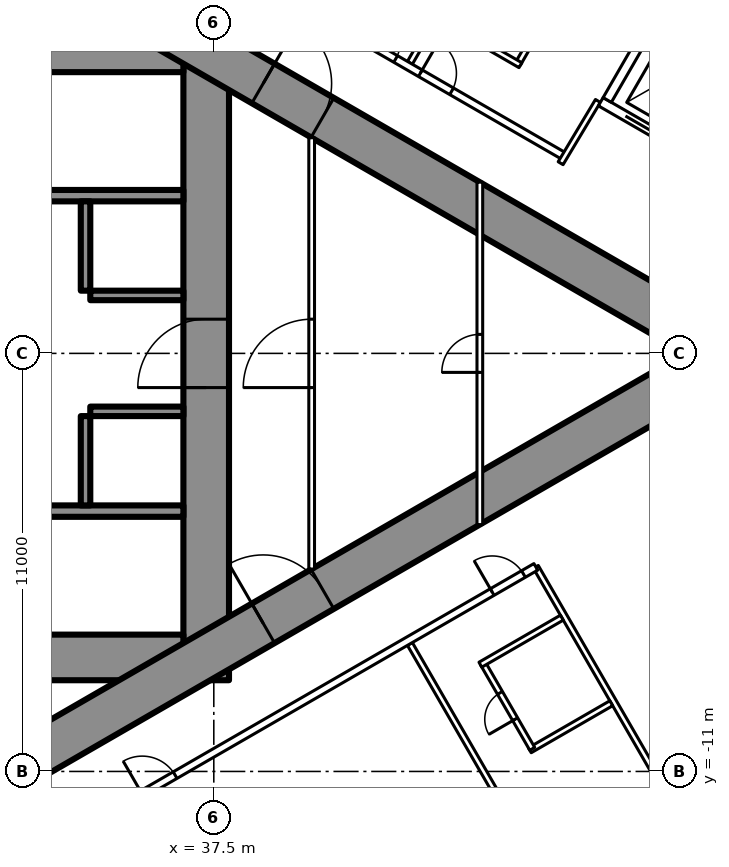
"""IFC4 building model, lengths in metres.
Left out: names, types, materials, properties, quantities, classifications, styles, units other than length and angle.
Written with IfcOpenShell. Run it as: python <this file> out.ifc"""

import sys

from ifc_helpers import new_model, si_unit, direction, frame, frame_2d, origin, origin_2d, place, context, subcontext, project, spatial, rectangle, circle, extrude, element, fill, save


model = new_model("IFC4")
c1 = context("Model", 3, precision=1e-05, world=origin(), true_north=direction((0.0, 1.0)))
c2 = subcontext(c1, "Body", "Model", "MODEL_VIEW")
j1 = project(units=[si_unit("LENGTHUNIT", "METRE"), si_unit("PLANEANGLEUNIT", "RADIAN")], contexts=[c1])
p1 = place(None, origin())
s1 = spatial("IfcSite", under=j1, at=p1, CompositionType="ELEMENT")
p2 = place(p1, origin())
s2 = spatial("IfcBuilding", under=s1, at=p2, CompositionType="ELEMENT")
p3 = place(p2, frame((0.0, 0.0, 229.7)))
s3 = spatial("IfcBuildingStorey", under=s2, at=p3, CompositionType="ELEMENT", Elevation=229.7)
p4 = place(p3, frame((49.834, -12.332, 0.0), z_axis=(0.0, 0.0, 1.0), x_axis=(1.0, 0.0, 0.0)))
e1 = element("IfcColumn", 1, at=p4, inside=s3, PredefinedType="COLUMN", context=c2, shape_type="SweptSolid", body=[
    extrude(circle(Radius=1.2, at=origin_2d()), origin(), (0.0, 0.0, 1.0), 3.6),
])
p5 = place(p3, frame((37.3, -8.6, 0.0), z_axis=(0.0, 0.0, 1.0), x_axis=(0.0, 1.0, 0.0)))
e2 = element("IfcWall", 2, at=p5, inside=s3, PredefinedType="SHEAR", context=c2, shape_type="SweptSolid", body=[
    extrude(rectangle(XDim=17.2, YDim=1.2, at=frame_2d((8.6, 0.0))), origin(), (0.0, 0.0, 1.0), 3.6),
])
p6 = place(p5, frame((7.7, 0.0, 0.0)))
e3 = element("IfcOpeningElement", 3, at=p6, cuts=e2, PredefinedType="OPENING", context=c2, shape_type="SweptSolid", body=[
    extrude(rectangle(XDim=1.8, YDim=2.2, at=frame_2d((0.9, 1.1))), frame((0.0, 0.61, 0.0), z_axis=(0.0, -1.0, 0.0), x_axis=(1.0, 0.0, 0.0)), (0.0, 0.0, 1.0), 1.22),
])
p7 = place(p3, frame((28.3, -8.0, 0.0), z_axis=(0.0, 0.0, 1.0), x_axis=(1.0, 0.0, 0.0)))
e4 = element("IfcWall", 4, at=p7, inside=s3, PredefinedType="SHEAR", context=c2, shape_type="SweptSolid", body=[
    extrude(rectangle(XDim=8.4, YDim=1.2, at=frame_2d((4.2, 0.0))), origin(), (0.0, 0.0, 1.0), 3.6),
])
p8 = place(p7, frame((0.25, 0.0, 0.0)))
e5 = element("IfcOpeningElement", 5, at=p8, cuts=e4, PredefinedType="OPENING", context=c2, shape_type="SweptSolid", body=[
    extrude(rectangle(XDim=1.0, YDim=2.2, at=frame_2d((0.5, 1.1))), frame((0.0, 0.61, 0.0), z_axis=(0.0, -1.0, 0.0), x_axis=(1.0, 0.0, 0.0)), (0.0, 0.0, 1.0), 1.22),
])
p9 = place(p3, frame((28.3, 8.0, 0.0), z_axis=(0.0, 0.0, 1.0), x_axis=(1.0, 0.0, 0.0)))
e6 = element("IfcWall", 6, at=p9, inside=s3, PredefinedType="SHEAR", context=c2, shape_type="SweptSolid", body=[
    extrude(rectangle(XDim=8.4, YDim=1.2, at=frame_2d((4.2, 0.0))), origin(), (0.0, 0.0, 1.0), 3.6),
])
p10 = place(p9, frame((0.25, 0.0, 0.0)))
e7 = element("IfcOpeningElement", 7, at=p10, cuts=e6, PredefinedType="OPENING", context=c2, shape_type="SweptSolid", body=[
    extrude(rectangle(XDim=1.0, YDim=2.2, at=frame_2d((0.5, 1.1))), frame((0.0, 0.61, 0.0), z_axis=(0.0, -1.0, 0.0), x_axis=(1.0, 0.0, 0.0)), (0.0, 0.0, 1.0), 1.22),
])
for number, where, z_axis, x_axis in (
    (8, (28.3, -4.15, 0.0), (0.0, 0.0, 1.0), (1.0, 0.0, 0.0)),
    (9, (28.3, 4.15, 0.0), (0.0, 0.0, 1.0), (1.0, 0.0, 0.0)),
):
    element("IfcWall", number, at=place(p3, frame(where, z_axis=z_axis, x_axis=x_axis)), inside=s3, PredefinedType="SHEAR", context=c2, shape_type="SweptSolid", body=[
        extrude(rectangle(XDim=8.4, YDim=0.3, at=frame_2d((4.2, 0.0))), origin(), (0.0, 0.0, 1.0), 3.6),
    ])
p11 = place(p3, frame((34.125, -4.0, 0.0), z_axis=(0.0, 0.0, 1.0), x_axis=(0.0, 1.0, 0.0)))
e10 = element("IfcWall", 10, at=p11, inside=s3, PredefinedType="SHEAR", context=c2, shape_type="SweptSolid", body=[
    extrude(rectangle(XDim=2.35, YDim=0.25, at=frame_2d((1.175, 0.0))), origin(), (0.0, 0.0, 1.0), 3.6),
])
p12 = place(p3, frame((34.25, -1.525, 0.0), z_axis=(0.0, 0.0, 1.0), x_axis=(1.0, 0.0, 0.0)))
e11 = element("IfcWall", 11, at=p12, inside=s3, PredefinedType="SHEAR", context=c2, shape_type="SweptSolid", body=[
    extrude(rectangle(XDim=2.45, YDim=0.25, at=frame_2d((1.225, 0.0))), origin(), (0.0, 0.0, 1.0), 3.6),
])
p13 = place(p3, frame((34.125, 1.65, 0.0), z_axis=(0.0, 0.0, 1.0), x_axis=(0.0, 1.0, 0.0)))
e12 = element("IfcWall", 12, at=p13, inside=s3, PredefinedType="SHEAR", context=c2, shape_type="SweptSolid", body=[
    extrude(rectangle(XDim=2.35, YDim=0.25, at=frame_2d((1.175, 0.0))), origin(), (0.0, 0.0, 1.0), 3.6),
])
p14 = place(p3, frame((34.25, 1.525, 0.0), z_axis=(0.0, 0.0, 1.0), x_axis=(1.0, 0.0, 0.0)))
e13 = element("IfcWall", 13, at=p14, inside=s3, PredefinedType="SHEAR", context=c2, shape_type="SweptSolid", body=[
    extrude(rectangle(XDim=2.45, YDim=0.25, at=frame_2d((1.225, 0.0))), origin(), (0.0, 0.0, 1.0), 3.6),
])
p15 = place(p3, frame((27.2, -13.8, 0.0), z_axis=(0.0, 0.0, 1.0), x_axis=(0.866027159892, 0.499996958321, 0.0)))
e14 = element("IfcWall", 14, at=p15, inside=s3, PredefinedType="SHEAR", context=c2, shape_type="SweptSolid", body=[
    extrude(rectangle(XDim=27.947, YDim=1.2, at=frame_2d((13.973, 0.0))), origin(), (0.0, 0.0, 1.0), 3.6),
])
p16 = place(p15, frame((4.6, 0.0, 0.0)))
e15 = element("IfcOpeningElement", 15, at=p16, cuts=e14, PredefinedType="OPENING", context=c2, shape_type="SweptSolid", body=[
    extrude(rectangle(XDim=1.0, YDim=2.2, at=frame_2d((0.5, 1.1))), frame((0.0, 0.61, 0.0), z_axis=(0.0, -1.0, 0.0), x_axis=(1.0, 0.0, 0.0)), (0.0, 0.0, 1.0), 1.22),
])
p17 = place(p15, frame((13.395, 0.0, 0.0)))
e16 = element("IfcOpeningElement", 16, at=p17, cuts=e14, PredefinedType="OPENING", context=c2, shape_type="SweptSolid", body=[
    extrude(rectangle(XDim=1.8, YDim=2.2, at=frame_2d((0.9, 1.1))), frame((0.0, 0.61, 0.0), z_axis=(0.0, -1.0, 0.0), x_axis=(1.0, 0.0, 0.0)), (0.0, 0.0, 1.0), 1.22),
])
p18 = place(p3, frame((27.2, 13.8, 0.0), z_axis=(0.0, 0.0, 1.0), x_axis=(0.866024515034, -0.500001539357, 0.0)))
e17 = element("IfcWall", 17, at=p18, inside=s3, PredefinedType="SHEAR", context=c2, shape_type="SweptSolid", body=[
    extrude(rectangle(XDim=26.907, YDim=1.2, at=frame_2d((13.454, 0.0))), origin(), (0.0, 0.0, 1.0), 3.6),
])
p19 = place(p18, frame((4.6, 0.0, 0.0)))
e18 = element("IfcOpeningElement", 18, at=p19, cuts=e17, PredefinedType="OPENING", context=c2, shape_type="SweptSolid", body=[
    extrude(rectangle(XDim=1.0, YDim=2.2, at=frame_2d((0.5, 1.1))), frame((0.0, 0.61, 0.0), z_axis=(0.0, -1.0, 0.0), x_axis=(1.0, 0.0, 0.0)), (0.0, 0.0, 1.0), 1.22),
])
p20 = place(p18, frame((13.395, 0.0, 0.0)))
e19 = element("IfcOpeningElement", 19, at=p20, cuts=e17, PredefinedType="OPENING", context=c2, shape_type="SweptSolid", body=[
    extrude(rectangle(XDim=1.8, YDim=2.2, at=frame_2d((0.9, 1.1))), frame((0.0, 0.61, 0.0), z_axis=(0.0, -1.0, 0.0), x_axis=(1.0, 0.0, 0.0)), (0.0, 0.0, 1.0), 1.22),
])
p21 = place(p3, frame((42.66, -7.646, 0.0), z_axis=(0.0, 0.0, 1.0), x_axis=(0.499996592859, -0.866027370889, 0.0)))
e20 = element("IfcWall", 20, at=p21, inside=s3, PredefinedType="PARTITIONING", context=c2, shape_type="SweptSolid", body=[
    extrude(rectangle(XDim=6.398, YDim=0.15, at=frame_2d((3.199, 0.0))), origin(), (0.0, 0.0, 1.0), 2.45),
])
p22 = place(p3, frame((45.973, -5.617, 0.0), z_axis=(0.0, 0.0, 1.0), x_axis=(0.499985856986, -0.866033569104, 0.0)))
e21 = element("IfcWall", 21, at=p22, inside=s3, PredefinedType="PARTITIONING", context=c2, shape_type="SweptSolid", body=[
    extrude(rectangle(XDim=6.526, YDim=0.15, at=frame_2d((3.263, 0.0))), origin(), (0.0, 0.0, 1.0), 2.45),
])
p23 = place(p3, frame((42.66, 7.646, 0.0), z_axis=(0.0, 0.0, 1.0), x_axis=(0.499996592859, 0.866027370889, 0.0)))
e22 = element("IfcWall", 22, at=p23, inside=s3, PredefinedType="PARTITIONING", context=c2, shape_type="SweptSolid", body=[
    extrude(rectangle(XDim=6.398, YDim=0.15, at=frame_2d((3.199, 0.0))), origin(), (0.0, 0.0, 1.0), 2.45),
])
p24 = place(p3, frame((28.959, 15.44, 0.0), z_axis=(0.0, 0.0, 1.0), x_axis=(0.866028936079, -0.499993881836, 0.0)))
e23 = element("IfcWall", 23, at=p24, inside=s3, PredefinedType="PARTITIONING", context=c2, shape_type="SweptSolid", body=[
    extrude(rectangle(XDim=20.503, YDim=0.2, at=frame_2d((10.251, 0.0))), origin(), (0.0, 0.0, 1.0), 3.35),
])
p25 = place(p24, frame((16.137, 0.0, 0.0)))
e24 = element("IfcOpeningElement", 24, at=p25, cuts=e23, PredefinedType="OPENING", context=c2, shape_type="SweptSolid", body=[
    extrude(rectangle(XDim=0.95, YDim=2.2, at=frame_2d((0.475, 1.1))), frame((0.0, 0.11, 0.0), z_axis=(0.0, -1.0, 0.0), x_axis=(1.0, 0.0, 0.0)), (0.0, 0.0, 1.0), 0.22),
])
p26 = place(p24, frame((14.437, 0.0, 0.0)))
e25 = element("IfcOpeningElement", 25, at=p26, cuts=e23, PredefinedType="OPENING", context=c2, shape_type="SweptSolid", body=[
    extrude(rectangle(XDim=0.95, YDim=2.2, at=frame_2d((0.475, 1.1))), frame((0.0, 0.11, 0.0), z_axis=(0.0, -1.0, 0.0), x_axis=(1.0, 0.0, 0.0)), (0.0, 0.0, 1.0), 0.22),
])
p27 = place(p24, frame((2.244, 0.0, 0.0)))
e26 = element("IfcOpeningElement", 26, at=p27, cuts=e23, PredefinedType="OPENING", context=c2, shape_type="SweptSolid", body=[
    extrude(rectangle(XDim=1.8, YDim=2.04, at=frame_2d((0.9, 1.02))), frame((0.0, 0.11, 0.0), z_axis=(0.0, -1.0, 0.0), x_axis=(1.0, 0.0, 0.0)), (0.0, 0.0, 1.0), 0.22),
])
p28 = place(p3, frame((47.606, 6.642, 0.0), z_axis=(0.0, 0.0, 1.0), x_axis=(-0.51353662755, -0.858067673418, 0.0)))
e27 = element("IfcWall", 27, at=p28, inside=s3, PredefinedType="PARTITIONING", context=c2, shape_type="SweptSolid", body=[
    extrude(rectangle(XDim=1.91, YDim=0.15, at=frame_2d((0.955, 0.0))), origin(), (0.0, 0.0, 1.0), 3.35),
])
p29 = place(p3, frame((45.814, -10.443, 0.0), z_axis=(0.0, 0.0, 1.0), x_axis=(0.866073894602, 0.499916002032, 0.0)))
e28 = element("IfcWall", 28, at=p29, inside=s3, PredefinedType="PARTITIONING", context=c2, shape_type="SweptSolid", body=[
    extrude(rectangle(XDim=2.475, YDim=0.15, at=frame_2d((1.238, 0.0))), origin(), (0.0, 0.0, 1.0), 3.35),
])
p30 = place(p3, frame((44.579, -8.154, 0.0), z_axis=(0.0, 0.0, 1.0), x_axis=(0.500006934395, -0.866021400173, 0.0)))
e29 = element("IfcWall", 29, at=p30, inside=s3, PredefinedType="PARTITIONING", context=c2, shape_type="SweptSolid", body=[
    extrude(rectangle(XDim=2.6, YDim=0.15, at=frame_2d((1.3, 0.0))), origin(), (0.0, 0.0, 1.0), 3.35),
])
p31 = place(p30, frame((0.9, 0.0, 0.0)))
e30 = element("IfcOpeningElement", 30, at=p31, cuts=e29, PredefinedType="OPENING", context=c2, shape_type="SweptSolid", body=[
    extrude(rectangle(XDim=0.8, YDim=2.2, at=frame_2d((0.4, 1.1))), frame((0.0, 0.085, 0.0), z_axis=(0.0, -1.0, 0.0), x_axis=(1.0, 0.0, 0.0)), (0.0, 0.0, 1.0), 0.17),
])
p32 = place(p3, frame((44.514, -8.191, 0.0), z_axis=(0.0, 0.0, 1.0), x_axis=(0.866031185235, 0.4999899861, 0.0)))
e31 = element("IfcWall", 31, at=p32, inside=s3, PredefinedType="PARTITIONING", context=c2, shape_type="SweptSolid", body=[
    extrude(rectangle(XDim=2.475, YDim=0.15, at=frame_2d((1.238, 0.0))), origin(), (0.0, 0.0, 1.0), 3.35),
])
p33 = place(p3, frame((45.503, 7.621, 0.0), z_axis=(0.0, 0.0, 1.0), x_axis=(0.500006934395, 0.866021400173, 0.0)))
e32 = element("IfcWall", 32, at=p33, inside=s3, PredefinedType="PARTITIONING", context=c2, shape_type="SweptSolid", body=[
    extrude(rectangle(XDim=2.6, YDim=0.15, at=frame_2d((1.3, 0.0))), origin(), (0.0, 0.0, 1.0), 3.35),
])
p34 = place(p33, frame((0.9, 0.0, 0.0)))
e33 = element("IfcOpeningElement", 33, at=p34, cuts=e32, PredefinedType="OPENING", context=c2, shape_type="SweptSolid", body=[
    extrude(rectangle(XDim=0.8, YDim=2.2, at=frame_2d((0.4, 1.1))), frame((0.0, 0.085, 0.0), z_axis=(0.0, -1.0, 0.0), x_axis=(1.0, 0.0, 0.0)), (0.0, 0.0, 1.0), 0.17),
])
p35 = place(p3, frame((43.425, 8.821, 0.0), z_axis=(0.0, 0.0, 1.0), x_axis=(0.866006523861, -0.500032699561, 0.0)))
e34 = element("IfcWall", 34, at=p35, inside=s3, PredefinedType="PARTITIONING", context=c2, shape_type="SweptSolid", body=[
    extrude(rectangle(XDim=2.475, YDim=0.15, at=frame_2d((1.237, 0.0))), origin(), (0.0, 0.0, 1.0), 2.5),
])
p36 = place(p3, frame((28.959, -15.44, 0.0), z_axis=(0.0, 0.0, 1.0), x_axis=(0.866025204199, 0.500000345692, 0.0)))
e35 = element("IfcWall", 35, at=p36, inside=s3, PredefinedType="PARTITIONING", context=c2, shape_type="SweptSolid", body=[
    extrude(rectangle(XDim=19.646, YDim=0.2, at=frame_2d((9.823, 0.0))), origin(), (0.0, 0.0, 1.0), 3.35),
])
p37 = place(p36, frame((1.494, 0.0, 0.0)))
e36 = element("IfcOpeningElement", 36, at=p37, cuts=e35, PredefinedType="OPENING", context=c2, shape_type="SweptSolid", body=[
    extrude(rectangle(XDim=1.8, YDim=2.04, at=frame_2d((0.9, 1.02))), frame((0.0, 0.11, 0.0), z_axis=(0.0, -1.0, 0.0), x_axis=(1.0, 0.0, 0.0)), (0.0, 0.0, 1.0), 0.22),
])
p38 = place(p36, frame((7.687, 0.0, 0.0)))
e37 = element("IfcOpeningElement", 37, at=p38, cuts=e35, PredefinedType="OPENING", context=c2, shape_type="SweptSolid", body=[
    extrude(rectangle(XDim=1.0, YDim=2.2, at=frame_2d((0.5, 1.1))), frame((0.0, 0.11, 0.0), z_axis=(0.0, -1.0, 0.0), x_axis=(1.0, 0.0, 0.0)), (0.0, 0.0, 1.0), 0.22),
])
p39 = place(p36, frame((18.321, 0.0, 0.0)))
e38 = element("IfcOpeningElement", 38, at=p39, cuts=e35, PredefinedType="OPENING", context=c2, shape_type="SweptSolid", body=[
    extrude(rectangle(XDim=0.95, YDim=2.2, at=frame_2d((0.475, 1.1))), frame((0.0, 0.11, 0.0), z_axis=(0.0, -1.0, 0.0), x_axis=(1.0, 0.0, 0.0)), (0.0, 0.0, 1.0), 0.22),
])
p40 = place(p3, frame((40.075, -5.674, 0.0), z_axis=(0.0, 0.0, 1.0), x_axis=(0.0, 1.0, 0.0)))
e39 = element("IfcWall", 39, at=p40, inside=s3, PredefinedType="PARTITIONING", context=c2, shape_type="SweptSolid", body=[
    extrude(rectangle(XDim=11.348, YDim=0.15, at=frame_2d((5.674, 0.0))), origin(), (0.0, 0.0, 1.0), 3.35),
])
p41 = place(p40, frame((4.774, 0.0, 0.0)))
e40 = element("IfcOpeningElement", 40, at=p41, cuts=e39, PredefinedType="OPENING", context=c2, shape_type="SweptSolid", body=[
    extrude(rectangle(XDim=1.8, YDim=2.2, at=frame_2d((0.9, 1.1))), frame((0.0, 0.085, 0.0), z_axis=(0.0, -1.0, 0.0), x_axis=(1.0, 0.0, 0.0)), (0.0, 0.0, 1.0), 0.17),
])
p42 = place(p3, frame((44.5, -4.505, 0.0), z_axis=(0.0, 0.0, 1.0), x_axis=(0.0, 1.0, 0.0)))
e41 = element("IfcWall", 41, at=p42, inside=s3, PredefinedType="PARTITIONING", context=c2, shape_type="SweptSolid", body=[
    extrude(rectangle(XDim=9.009, YDim=0.15, at=frame_2d((4.505, 0.0))), origin(), (0.0, 0.0, 1.0), 3.35),
])
p43 = place(p42, frame((4.005, 0.0, 0.0)))
e42 = element("IfcOpeningElement", 42, at=p43, cuts=e41, PredefinedType="OPENING", context=c2, shape_type="SweptSolid", body=[
    extrude(rectangle(XDim=1.0, YDim=2.2, at=frame_2d((0.5, 1.1))), frame((0.0, 0.085, 0.0), z_axis=(0.0, -1.0, 0.0), x_axis=(1.0, 0.0, 0.0)), (0.0, 0.0, 1.0), 0.17),
])
p44 = place(p3, frame((47.681, 6.622, 0.0), z_axis=(0.0, 0.0, 1.0), x_axis=(0.86603344179, -0.499986077507, 0.0)))
e43 = element("IfcWall", 43, at=p44, inside=s3, PredefinedType="PARTITIONING", context=c2, shape_type="SweptSolid", body=[
    extrude(rectangle(XDim=6.6, YDim=0.25, at=frame_2d((3.3, 0.0))), origin(), (0.0, 0.0, 1.0), 3.35),
])
p45 = place(p44, frame((0.75, 0.0, 0.0)))
e44 = element("IfcOpeningElement", 44, at=p45, cuts=e43, PredefinedType="OPENING", context=c2, shape_type="SweptSolid", body=[
    extrude(rectangle(XDim=1.1, YDim=2.2, at=frame_2d((0.55, 1.1))), frame((0.0, 0.135, 0.0), z_axis=(0.0, -1.0, 0.0), x_axis=(1.0, 0.0, 0.0)), (0.0, 0.0, 1.0), 0.27),
])
p46 = place(p44, frame((2.75, 0.0, 0.0)))
e45 = element("IfcOpeningElement", 45, at=p46, cuts=e43, PredefinedType="OPENING", context=c2, shape_type="SweptSolid", body=[
    extrude(rectangle(XDim=1.1, YDim=2.2, at=frame_2d((0.55, 1.1))), frame((0.0, 0.135, 0.0), z_axis=(0.0, -1.0, 0.0), x_axis=(1.0, 0.0, 0.0)), (0.0, 0.0, 1.0), 0.27),
])
p47 = place(p44, frame((4.75, 0.0, 0.0)))
e46 = element("IfcOpeningElement", 46, at=p47, cuts=e43, PredefinedType="OPENING", context=c2, shape_type="SweptSolid", body=[
    extrude(rectangle(XDim=1.1, YDim=2.2, at=frame_2d((0.55, 1.1))), frame((0.0, 0.135, 0.0), z_axis=(0.0, -1.0, 0.0), x_axis=(1.0, 0.0, 0.0)), (0.0, 0.0, 1.0), 0.27),
])
p48 = place(p3, frame((47.852, 6.668, 0.0), z_axis=(0.0, 0.0, 1.0), x_axis=(0.499929347863, 0.866066190972, 0.0)))
e47 = element("IfcWall", 47, at=p48, inside=s3, PredefinedType="PARTITIONING", context=c2, shape_type="SweptSolid", body=[
    extrude(rectangle(XDim=3.201, YDim=0.25, at=frame_2d((1.6, 0.0))), origin(), (0.0, 0.0, 1.0), 3.35),
])
p49 = place(p38, origin())
e48 = element("IfcDoor", 48, at=p49, inside=s3, OperationType="SINGLE_SWING_LEFT", PredefinedType="DOOR", context=c2, shape_type="SweptSolid", body=[
    extrude(rectangle(XDim=1.0, YDim=2.2, at=frame_2d((0.5, 1.1))), frame((0.0, 0.025, 0.0), z_axis=(0.0, -1.0, 0.0), x_axis=(1.0, 0.0, 0.0)), (0.0, 0.0, 1.0), 0.05),
])
fill(e37, e48)
p50 = place(p31, origin())
e49 = element("IfcDoor", 49, at=p50, inside=s3, OperationType="SINGLE_SWING_RIGHT", PredefinedType="DOOR", context=c2, shape_type="SweptSolid", body=[
    extrude(rectangle(XDim=0.8, YDim=2.2, at=frame_2d((0.4, 1.1))), frame((0.0, 0.025, 0.0), z_axis=(0.0, -1.0, 0.0), x_axis=(1.0, 0.0, 0.0)), (0.0, 0.0, 1.0), 0.05),
])
fill(e30, e49)
p51 = place(p39, origin())
e50 = element("IfcDoor", 50, at=p51, inside=s3, OperationType="SINGLE_SWING_LEFT", PredefinedType="DOOR", context=c2, shape_type="SweptSolid", body=[
    extrude(rectangle(XDim=0.95, YDim=2.2, at=frame_2d((0.475, 1.1))), frame((0.0, 0.025, 0.0), z_axis=(0.0, -1.0, 0.0), x_axis=(1.0, 0.0, 0.0)), (0.0, 0.0, 1.0), 0.05),
])
fill(e38, e50)
p52 = place(p25, origin())
e51 = element("IfcDoor", 51, at=p52, inside=s3, OperationType="SINGLE_SWING_LEFT", PredefinedType="DOOR", context=c2, shape_type="SweptSolid", body=[
    extrude(rectangle(XDim=0.95, YDim=2.2, at=frame_2d((0.475, 1.1))), frame((0.0, 0.025, 0.0), z_axis=(0.0, -1.0, 0.0), x_axis=(1.0, 0.0, 0.0)), (0.0, 0.0, 1.0), 0.05),
])
fill(e24, e51)
p53 = place(p26, origin())
e52 = element("IfcDoor", 52, at=p53, inside=s3, OperationType="SINGLE_SWING_LEFT", PredefinedType="DOOR", context=c2, shape_type="SweptSolid", body=[
    extrude(rectangle(XDim=0.95, YDim=2.2, at=frame_2d((0.475, 1.1))), frame((0.0, 0.025, 0.0), z_axis=(0.0, -1.0, 0.0), x_axis=(1.0, 0.0, 0.0)), (0.0, 0.0, 1.0), 0.05),
])
fill(e25, e52)
p54 = place(p41, origin())
e53 = element("IfcDoor", 53, at=p54, inside=s3, OperationType="DOUBLE_DOOR_SINGLE_SWING", PredefinedType="DOOR", context=c2, shape_type="SweptSolid", body=[
    extrude(rectangle(XDim=1.8, YDim=2.2, at=frame_2d((0.9, 1.1))), frame((0.0, 0.025, 0.0), z_axis=(0.0, -1.0, 0.0), x_axis=(1.0, 0.0, 0.0)), (0.0, 0.0, 1.0), 0.05),
])
fill(e40, e53)
p55 = place(p43, origin())
e54 = element("IfcDoor", 54, at=p55, inside=s3, OperationType="SINGLE_SWING_LEFT", PredefinedType="DOOR", context=c2, shape_type="SweptSolid", body=[
    extrude(rectangle(XDim=1.0, YDim=2.2, at=frame_2d((0.5, 1.1))), frame((0.0, 0.025, 0.0), z_axis=(0.0, -1.0, 0.0), x_axis=(1.0, 0.0, 0.0)), (0.0, 0.0, 1.0), 0.05),
])
fill(e42, e54)
p56 = place(p17, origin())
e55 = element("IfcDoor", 55, at=p56, inside=s3, OperationType="DOUBLE_DOOR_SINGLE_SWING", PredefinedType="DOOR", context=c2, shape_type="SweptSolid", body=[
    extrude(rectangle(XDim=1.8, YDim=2.2, at=frame_2d((0.9, 1.1))), frame((0.0, 0.025, 0.0), z_axis=(0.0, -1.0, 0.0), x_axis=(1.0, 0.0, 0.0)), (0.0, 0.0, 1.0), 0.05),
])
fill(e16, e55)
p57 = place(p20, origin())
e56 = element("IfcDoor", 56, at=p57, inside=s3, OperationType="DOUBLE_DOOR_SINGLE_SWING", PredefinedType="DOOR", context=c2, shape_type="SweptSolid", body=[
    extrude(rectangle(XDim=1.8, YDim=2.2, at=frame_2d((0.9, 1.1))), frame((0.0, 0.025, 0.0), z_axis=(0.0, -1.0, 0.0), x_axis=(1.0, 0.0, 0.0)), (0.0, 0.0, 1.0), 0.05),
])
fill(e19, e56)
p58 = place(p6, origin())
e57 = element("IfcDoor", 57, at=p58, inside=s3, OperationType="DOUBLE_DOOR_SINGLE_SWING", PredefinedType="DOOR", context=c2, shape_type="SweptSolid", body=[
    extrude(rectangle(XDim=1.8, YDim=2.2, at=frame_2d((0.9, 1.1))), frame((0.0, 0.025, 0.0), z_axis=(0.0, -1.0, 0.0), x_axis=(1.0, 0.0, 0.0)), (0.0, 0.0, 1.0), 0.05),
])
fill(e3, e57)
p59 = place(p45, origin())
e58 = element("IfcDoor", 58, at=p59, inside=s3, OperationType="DOUBLE_DOOR_SLIDING", PredefinedType="USERDEFINED", context=c2, shape_type="SweptSolid", body=[
    extrude(rectangle(XDim=1.1, YDim=2.2, at=frame_2d((0.55, 1.1))), frame((0.0, 0.025, 0.0), z_axis=(0.0, -1.0, 0.0), x_axis=(1.0, 0.0, 0.0)), (0.0, 0.0, 1.0), 0.05),
])
fill(e44, e58)
save(model, sys.argv[1])
